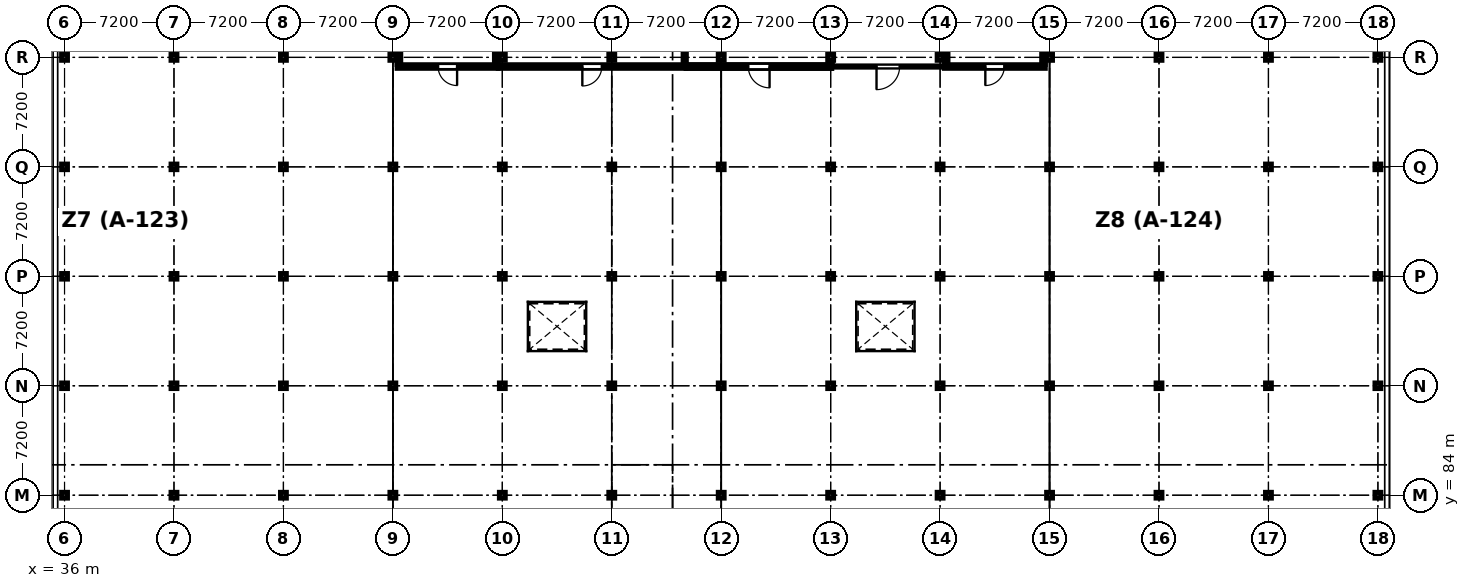
"""IFC4 building model, lengths in metres.
Left out: names, types, materials, properties, quantities, classifications, styles, units other than length and angle.
Written with IfcOpenShell. Run it as: python <this file> out.ifc"""

import sys

from ifc_helpers import new_model, si_unit, direction, frame, frame_2d, origin, origin_2d, place, context, subcontext, project, spatial, rectangle, i_section, extrude, element, fill, save


model = new_model("IFC4")
c1 = context("Model", 3, precision=1e-05, world=origin(), true_north=direction((0.0, 1.0)))
c2 = subcontext(c1, "Body", "Model", "MODEL_VIEW")
j1 = project(units=[si_unit("LENGTHUNIT", "METRE"), si_unit("PLANEANGLEUNIT", "RADIAN")], contexts=[c1])
p1 = place(None, origin())
s1 = spatial("IfcSite", under=j1, at=p1, CompositionType="ELEMENT")
p2 = place(p1, origin())
s2 = spatial("IfcBuilding", under=s1, at=p2, CompositionType="ELEMENT")
p3 = place(p2, frame((0.0, 0.0, 5.4)))
s3 = spatial("IfcBuildingStorey", under=s2, at=p3, CompositionType="ELEMENT", Elevation=5.4)
p4 = place(p3, frame((36.0, 84.0, 0.0), z_axis=(0.0, 0.0, 1.0), x_axis=(1.0, 0.0, 0.0)))
e1 = element("IfcColumn", 1, at=p4, inside=s3, PredefinedType="COLUMN", context=c2, shape_type="SweptSolid", body=[
    extrude(i_section(OverallWidth=0.399, OverallDepth=0.394, WebThickness=0.023, FlangeThickness=0.037, FilletRadius=0.015, at=origin_2d()), origin(), (0.0, 0.0, 1.0), 3.9),
])
for number, where, z_axis, x_axis in (
    (2, (36.0, 91.2, 0.0), (0.0, 0.0, 1.0), (1.0, 0.0, 0.0)),
    (3, (36.0, 98.4, 0.0), (0.0, 0.0, 1.0), (1.0, 0.0, 0.0)),
    (4, (36.0, 105.6, 0.0), (0.0, 0.0, 1.0), (1.0, 0.0, 0.0)),
):
    element("IfcColumn", number, at=place(p3, frame(where, z_axis=z_axis, x_axis=x_axis)), inside=s3, PredefinedType="COLUMN", context=c2, shape_type="SweptSolid", body=[
        extrude(i_section(OverallWidth=0.396, OverallDepth=0.381, WebThickness=0.019, FlangeThickness=0.03, FilletRadius=0.015, at=origin_2d()), origin(), (0.0, 0.0, 1.0), 3.9),
    ])
for number, where, z_axis, x_axis in (
    (5, (36.0, 112.8, 0.0), (0.0, 0.0, 1.0), (1.0, 0.0, 0.0)),
    (6, (43.2, 84.0, 0.0), (0.0, 0.0, 1.0), (1.0, 0.0, 0.0)),
):
    element("IfcColumn", number, at=place(p3, frame(where, z_axis=z_axis, x_axis=x_axis)), inside=s3, PredefinedType="COLUMN", context=c2, shape_type="SweptSolid", body=[
        extrude(i_section(OverallWidth=0.399, OverallDepth=0.394, WebThickness=0.023, FlangeThickness=0.037, FilletRadius=0.015, at=origin_2d()), origin(), (0.0, 0.0, 1.0), 3.9),
    ])
for number, where, z_axis, x_axis in (
    (7, (43.2, 91.2, 0.0), (0.0, 0.0, 1.0), (1.0, 0.0, 0.0)),
    (8, (43.2, 98.4, 0.0), (0.0, 0.0, 1.0), (1.0, 0.0, 0.0)),
    (9, (43.2, 105.6, 0.0), (0.0, 0.0, 1.0), (1.0, 0.0, 0.0)),
):
    element("IfcColumn", number, at=place(p3, frame(where, z_axis=z_axis, x_axis=x_axis)), inside=s3, PredefinedType="COLUMN", context=c2, shape_type="SweptSolid", body=[
        extrude(i_section(OverallWidth=0.396, OverallDepth=0.381, WebThickness=0.019, FlangeThickness=0.03, FilletRadius=0.015, at=origin_2d()), origin(), (0.0, 0.0, 1.0), 3.9),
    ])
for number, where, z_axis, x_axis in (
    (10, (43.2, 112.8, 0.0), (0.0, 0.0, 1.0), (1.0, 0.0, 0.0)),
    (11, (50.4, 84.0, 0.0), (0.0, 0.0, 1.0), (1.0, 0.0, 0.0)),
):
    element("IfcColumn", number, at=place(p3, frame(where, z_axis=z_axis, x_axis=x_axis)), inside=s3, PredefinedType="COLUMN", context=c2, shape_type="SweptSolid", body=[
        extrude(i_section(OverallWidth=0.399, OverallDepth=0.394, WebThickness=0.023, FlangeThickness=0.037, FilletRadius=0.015, at=origin_2d()), origin(), (0.0, 0.0, 1.0), 3.9),
    ])
for number, where, z_axis, x_axis in (
    (12, (50.4, 91.2, 0.0), (0.0, 0.0, 1.0), (1.0, 0.0, 0.0)),
    (13, (50.4, 98.4, 0.0), (0.0, 0.0, 1.0), (1.0, 0.0, 0.0)),
    (14, (50.4, 105.6, 0.0), (0.0, 0.0, 1.0), (1.0, 0.0, 0.0)),
):
    element("IfcColumn", number, at=place(p3, frame(where, z_axis=z_axis, x_axis=x_axis)), inside=s3, PredefinedType="COLUMN", context=c2, shape_type="SweptSolid", body=[
        extrude(i_section(OverallWidth=0.396, OverallDepth=0.381, WebThickness=0.019, FlangeThickness=0.03, FilletRadius=0.015, at=origin_2d()), origin(), (0.0, 0.0, 1.0), 3.9),
    ])
for number, where, z_axis, x_axis in (
    (15, (50.4, 112.8, 0.0), (0.0, 0.0, 1.0), (1.0, 0.0, 0.0)),
    (16, (57.6, 84.0, 0.0), (0.0, 0.0, 1.0), (1.0, 0.0, 0.0)),
):
    element("IfcColumn", number, at=place(p3, frame(where, z_axis=z_axis, x_axis=x_axis)), inside=s3, PredefinedType="COLUMN", context=c2, shape_type="SweptSolid", body=[
        extrude(i_section(OverallWidth=0.399, OverallDepth=0.394, WebThickness=0.023, FlangeThickness=0.037, FilletRadius=0.015, at=origin_2d()), origin(), (0.0, 0.0, 1.0), 3.9),
    ])
for number, where, z_axis, x_axis in (
    (17, (57.6, 91.2, 0.0), (0.0, 0.0, 1.0), (1.0, 0.0, 0.0)),
    (18, (57.6, 98.4, 0.0), (0.0, 0.0, 1.0), (1.0, 0.0, 0.0)),
    (19, (57.6, 105.6, 0.0), (0.0, 0.0, 1.0), (1.0, 0.0, 0.0)),
):
    element("IfcColumn", number, at=place(p3, frame(where, z_axis=z_axis, x_axis=x_axis)), inside=s3, PredefinedType="COLUMN", context=c2, shape_type="SweptSolid", body=[
        extrude(i_section(OverallWidth=0.396, OverallDepth=0.381, WebThickness=0.019, FlangeThickness=0.03, FilletRadius=0.015, at=origin_2d()), origin(), (0.0, 0.0, 1.0), 3.9),
    ])
for number, where, z_axis, x_axis in (
    (20, (57.6, 112.8, 0.0), (0.0, 0.0, 1.0), (1.0, 0.0, 0.0)),
    (21, (64.8, 84.0, 0.0), (0.0, 0.0, 1.0), (1.0, 0.0, 0.0)),
):
    element("IfcColumn", number, at=place(p3, frame(where, z_axis=z_axis, x_axis=x_axis)), inside=s3, PredefinedType="COLUMN", context=c2, shape_type="SweptSolid", body=[
        extrude(i_section(OverallWidth=0.399, OverallDepth=0.394, WebThickness=0.023, FlangeThickness=0.037, FilletRadius=0.015, at=origin_2d()), origin(), (0.0, 0.0, 1.0), 3.9),
    ])
for number, where, z_axis, x_axis in (
    (22, (64.8, 91.2, 0.0), (0.0, 0.0, 1.0), (1.0, 0.0, 0.0)),
    (23, (64.8, 98.4, 0.0), (0.0, 0.0, 1.0), (1.0, 0.0, 0.0)),
    (24, (64.8, 105.6, 0.0), (0.0, 0.0, 1.0), (1.0, 0.0, 0.0)),
):
    element("IfcColumn", number, at=place(p3, frame(where, z_axis=z_axis, x_axis=x_axis)), inside=s3, PredefinedType="COLUMN", context=c2, shape_type="SweptSolid", body=[
        extrude(i_section(OverallWidth=0.396, OverallDepth=0.381, WebThickness=0.019, FlangeThickness=0.03, FilletRadius=0.015, at=origin_2d()), origin(), (0.0, 0.0, 1.0), 3.9),
    ])
for number, where, z_axis, x_axis in (
    (25, (64.8, 112.8, 0.0), (0.0, 0.0, 1.0), (1.0, 0.0, 0.0)),
    (26, (72.0, 84.0, 0.0), (0.0, 0.0, 1.0), (1.0, 0.0, 0.0)),
):
    element("IfcColumn", number, at=place(p3, frame(where, z_axis=z_axis, x_axis=x_axis)), inside=s3, PredefinedType="COLUMN", context=c2, shape_type="SweptSolid", body=[
        extrude(i_section(OverallWidth=0.399, OverallDepth=0.394, WebThickness=0.023, FlangeThickness=0.037, FilletRadius=0.015, at=origin_2d()), origin(), (0.0, 0.0, 1.0), 3.9),
    ])
for number, where, z_axis, x_axis in (
    (27, (72.0, 91.2, 0.0), (0.0, 0.0, 1.0), (1.0, 0.0, 0.0)),
    (28, (72.0, 98.4, 0.0), (0.0, 0.0, 1.0), (1.0, 0.0, 0.0)),
    (29, (72.0, 105.6, 0.0), (0.0, 0.0, 1.0), (1.0, 0.0, 0.0)),
):
    element("IfcColumn", number, at=place(p3, frame(where, z_axis=z_axis, x_axis=x_axis)), inside=s3, PredefinedType="COLUMN", context=c2, shape_type="SweptSolid", body=[
        extrude(i_section(OverallWidth=0.396, OverallDepth=0.381, WebThickness=0.019, FlangeThickness=0.03, FilletRadius=0.015, at=origin_2d()), origin(), (0.0, 0.0, 1.0), 3.9),
    ])
for number, where, z_axis, x_axis in (
    (30, (72.0, 112.8, 0.0), (0.0, 0.0, 1.0), (1.0, 0.0, 0.0)),
    (31, (79.2, 84.0, 0.0), (0.0, 0.0, 1.0), (1.0, 0.0, 0.0)),
):
    element("IfcColumn", number, at=place(p3, frame(where, z_axis=z_axis, x_axis=x_axis)), inside=s3, PredefinedType="COLUMN", context=c2, shape_type="SweptSolid", body=[
        extrude(i_section(OverallWidth=0.399, OverallDepth=0.394, WebThickness=0.023, FlangeThickness=0.037, FilletRadius=0.015, at=origin_2d()), origin(), (0.0, 0.0, 1.0), 3.9),
    ])
for number, where, z_axis, x_axis in (
    (32, (79.2, 91.2, 0.0), (0.0, 0.0, 1.0), (1.0, 0.0, 0.0)),
    (33, (79.2, 98.4, 0.0), (0.0, 0.0, 1.0), (1.0, 0.0, 0.0)),
    (34, (79.2, 105.6, 0.0), (0.0, 0.0, 1.0), (1.0, 0.0, 0.0)),
):
    element("IfcColumn", number, at=place(p3, frame(where, z_axis=z_axis, x_axis=x_axis)), inside=s3, PredefinedType="COLUMN", context=c2, shape_type="SweptSolid", body=[
        extrude(i_section(OverallWidth=0.396, OverallDepth=0.381, WebThickness=0.019, FlangeThickness=0.03, FilletRadius=0.015, at=origin_2d()), origin(), (0.0, 0.0, 1.0), 3.9),
    ])
for number, where, z_axis, x_axis in (
    (35, (79.2, 112.8, 0.0), (0.0, 0.0, 1.0), (1.0, 0.0, 0.0)),
    (36, (86.4, 84.0, 0.0), (0.0, 0.0, 1.0), (1.0, 0.0, 0.0)),
):
    element("IfcColumn", number, at=place(p3, frame(where, z_axis=z_axis, x_axis=x_axis)), inside=s3, PredefinedType="COLUMN", context=c2, shape_type="SweptSolid", body=[
        extrude(i_section(OverallWidth=0.399, OverallDepth=0.394, WebThickness=0.023, FlangeThickness=0.037, FilletRadius=0.015, at=origin_2d()), origin(), (0.0, 0.0, 1.0), 3.9),
    ])
for number, where, z_axis, x_axis in (
    (37, (86.4, 91.2, 0.0), (0.0, 0.0, 1.0), (1.0, 0.0, 0.0)),
    (38, (86.4, 98.4, 0.0), (0.0, 0.0, 1.0), (1.0, 0.0, 0.0)),
    (39, (86.4, 105.6, 0.0), (0.0, 0.0, 1.0), (1.0, 0.0, 0.0)),
):
    element("IfcColumn", number, at=place(p3, frame(where, z_axis=z_axis, x_axis=x_axis)), inside=s3, PredefinedType="COLUMN", context=c2, shape_type="SweptSolid", body=[
        extrude(i_section(OverallWidth=0.396, OverallDepth=0.381, WebThickness=0.019, FlangeThickness=0.03, FilletRadius=0.015, at=origin_2d()), origin(), (0.0, 0.0, 1.0), 3.9),
    ])
for number, where, z_axis, x_axis in (
    (40, (86.4, 112.8, 0.0), (0.0, 0.0, 1.0), (1.0, 0.0, 0.0)),
    (41, (93.6, 84.0, 0.0), (0.0, 0.0, 1.0), (1.0, 0.0, 0.0)),
):
    element("IfcColumn", number, at=place(p3, frame(where, z_axis=z_axis, x_axis=x_axis)), inside=s3, PredefinedType="COLUMN", context=c2, shape_type="SweptSolid", body=[
        extrude(i_section(OverallWidth=0.399, OverallDepth=0.394, WebThickness=0.023, FlangeThickness=0.037, FilletRadius=0.015, at=origin_2d()), origin(), (0.0, 0.0, 1.0), 3.9),
    ])
for number, where, z_axis, x_axis in (
    (42, (93.6, 91.2, 0.0), (0.0, 0.0, 1.0), (1.0, 0.0, 0.0)),
    (43, (93.6, 98.4, 0.0), (0.0, 0.0, 1.0), (1.0, 0.0, 0.0)),
    (44, (93.6, 105.6, 0.0), (0.0, 0.0, 1.0), (1.0, 0.0, 0.0)),
):
    element("IfcColumn", number, at=place(p3, frame(where, z_axis=z_axis, x_axis=x_axis)), inside=s3, PredefinedType="COLUMN", context=c2, shape_type="SweptSolid", body=[
        extrude(i_section(OverallWidth=0.396, OverallDepth=0.381, WebThickness=0.019, FlangeThickness=0.03, FilletRadius=0.015, at=origin_2d()), origin(), (0.0, 0.0, 1.0), 3.9),
    ])
for number, where, z_axis, x_axis in (
    (45, (93.6, 112.8, 0.0), (0.0, 0.0, 1.0), (1.0, 0.0, 0.0)),
    (46, (100.8, 84.0, 0.0), (0.0, 0.0, 1.0), (1.0, 0.0, 0.0)),
):
    element("IfcColumn", number, at=place(p3, frame(where, z_axis=z_axis, x_axis=x_axis)), inside=s3, PredefinedType="COLUMN", context=c2, shape_type="SweptSolid", body=[
        extrude(i_section(OverallWidth=0.399, OverallDepth=0.394, WebThickness=0.023, FlangeThickness=0.037, FilletRadius=0.015, at=origin_2d()), origin(), (0.0, 0.0, 1.0), 3.9),
    ])
for number, where, z_axis, x_axis in (
    (47, (100.8, 91.2, 0.0), (0.0, 0.0, 1.0), (1.0, 0.0, 0.0)),
    (48, (100.8, 98.4, 0.0), (0.0, 0.0, 1.0), (1.0, 0.0, 0.0)),
    (49, (100.8, 105.6, 0.0), (0.0, 0.0, 1.0), (1.0, 0.0, 0.0)),
):
    element("IfcColumn", number, at=place(p3, frame(where, z_axis=z_axis, x_axis=x_axis)), inside=s3, PredefinedType="COLUMN", context=c2, shape_type="SweptSolid", body=[
        extrude(i_section(OverallWidth=0.396, OverallDepth=0.381, WebThickness=0.019, FlangeThickness=0.03, FilletRadius=0.015, at=origin_2d()), origin(), (0.0, 0.0, 1.0), 3.9),
    ])
for number, where, z_axis, x_axis in (
    (50, (100.8, 112.8, 0.0), (0.0, 0.0, 1.0), (1.0, 0.0, 0.0)),
    (51, (108.0, 84.0, 0.0), (0.0, 0.0, 1.0), (1.0, 0.0, 0.0)),
):
    element("IfcColumn", number, at=place(p3, frame(where, z_axis=z_axis, x_axis=x_axis)), inside=s3, PredefinedType="COLUMN", context=c2, shape_type="SweptSolid", body=[
        extrude(i_section(OverallWidth=0.399, OverallDepth=0.394, WebThickness=0.023, FlangeThickness=0.037, FilletRadius=0.015, at=origin_2d()), origin(), (0.0, 0.0, 1.0), 3.9),
    ])
for number, where, z_axis, x_axis in (
    (52, (108.0, 91.2, 0.0), (0.0, 0.0, 1.0), (1.0, 0.0, 0.0)),
    (53, (108.0, 98.4, 0.0), (0.0, 0.0, 1.0), (1.0, 0.0, 0.0)),
    (54, (108.0, 105.6, 0.0), (0.0, 0.0, 1.0), (1.0, 0.0, 0.0)),
):
    element("IfcColumn", number, at=place(p3, frame(where, z_axis=z_axis, x_axis=x_axis)), inside=s3, PredefinedType="COLUMN", context=c2, shape_type="SweptSolid", body=[
        extrude(i_section(OverallWidth=0.396, OverallDepth=0.381, WebThickness=0.019, FlangeThickness=0.03, FilletRadius=0.015, at=origin_2d()), origin(), (0.0, 0.0, 1.0), 3.9),
    ])
for number, where, z_axis, x_axis in (
    (55, (108.0, 112.8, 0.0), (0.0, 0.0, 1.0), (1.0, 0.0, 0.0)),
    (56, (115.2, 84.0, 0.0), (0.0, 0.0, 1.0), (1.0, 0.0, 0.0)),
):
    element("IfcColumn", number, at=place(p3, frame(where, z_axis=z_axis, x_axis=x_axis)), inside=s3, PredefinedType="COLUMN", context=c2, shape_type="SweptSolid", body=[
        extrude(i_section(OverallWidth=0.399, OverallDepth=0.394, WebThickness=0.023, FlangeThickness=0.037, FilletRadius=0.015, at=origin_2d()), origin(), (0.0, 0.0, 1.0), 3.9),
    ])
for number, where, z_axis, x_axis in (
    (57, (115.2, 91.2, 0.0), (0.0, 0.0, 1.0), (1.0, 0.0, 0.0)),
    (58, (115.2, 98.4, 0.0), (0.0, 0.0, 1.0), (1.0, 0.0, 0.0)),
    (59, (115.2, 105.6, 0.0), (0.0, 0.0, 1.0), (1.0, 0.0, 0.0)),
):
    element("IfcColumn", number, at=place(p3, frame(where, z_axis=z_axis, x_axis=x_axis)), inside=s3, PredefinedType="COLUMN", context=c2, shape_type="SweptSolid", body=[
        extrude(i_section(OverallWidth=0.396, OverallDepth=0.381, WebThickness=0.019, FlangeThickness=0.03, FilletRadius=0.015, at=origin_2d()), origin(), (0.0, 0.0, 1.0), 3.9),
    ])
for number, where, z_axis, x_axis in (
    (60, (115.2, 112.8, 0.0), (0.0, 0.0, 1.0), (1.0, 0.0, 0.0)),
    (61, (122.4, 84.0, 0.0), (0.0, 0.0, 1.0), (1.0, 0.0, 0.0)),
):
    element("IfcColumn", number, at=place(p3, frame(where, z_axis=z_axis, x_axis=x_axis)), inside=s3, PredefinedType="COLUMN", context=c2, shape_type="SweptSolid", body=[
        extrude(i_section(OverallWidth=0.399, OverallDepth=0.394, WebThickness=0.023, FlangeThickness=0.037, FilletRadius=0.015, at=origin_2d()), origin(), (0.0, 0.0, 1.0), 3.9),
    ])
for number, where, z_axis, x_axis in (
    (62, (122.4, 91.2, 0.0), (0.0, 0.0, 1.0), (1.0, 0.0, 0.0)),
    (63, (122.4, 98.4, 0.0), (0.0, 0.0, 1.0), (1.0, 0.0, 0.0)),
    (64, (122.4, 105.6, 0.0), (0.0, 0.0, 1.0), (1.0, 0.0, 0.0)),
):
    element("IfcColumn", number, at=place(p3, frame(where, z_axis=z_axis, x_axis=x_axis)), inside=s3, PredefinedType="COLUMN", context=c2, shape_type="SweptSolid", body=[
        extrude(i_section(OverallWidth=0.396, OverallDepth=0.381, WebThickness=0.019, FlangeThickness=0.03, FilletRadius=0.015, at=origin_2d()), origin(), (0.0, 0.0, 1.0), 3.9),
    ])
p5 = place(p3, frame((122.4, 112.8, 0.0), z_axis=(0.0, 0.0, 1.0), x_axis=(1.0, 0.0, 0.0)))
e65 = element("IfcColumn", 65, at=p5, inside=s3, PredefinedType="COLUMN", context=c2, shape_type="SweptSolid", body=[
    extrude(i_section(OverallWidth=0.399, OverallDepth=0.394, WebThickness=0.023, FlangeThickness=0.037, FilletRadius=0.015, at=origin_2d()), origin(), (0.0, 0.0, 1.0), 3.9),
])
p6 = place(p3, frame((64.525, 112.2, 0.0), z_axis=(0.0, 0.0, 1.0), x_axis=(-1.0, 0.0, 0.0)))
e66 = element("IfcWall", 66, at=p6, inside=s3, PredefinedType="PARTITIONING", context=c2, shape_type="SweptSolid", body=[
    extrude(rectangle(XDim=6.65, YDim=0.25, at=frame_2d((3.325, 0.0))), origin(), (0.0, 0.0, 1.0), 2.967),
])
p7 = place(p6, frame((2.7, 0.0, 0.0)))
e67 = element("IfcOpeningElement", 67, at=p7, cuts=e66, PredefinedType="OPENING", context=c2, shape_type="SweptSolid", body=[
    extrude(rectangle(XDim=1.25, YDim=2.2, at=frame_2d((0.625, 1.1))), frame((0.0, 0.135, 0.0), z_axis=(0.0, -1.0, 0.0), x_axis=(1.0, 0.0, 0.0)), (0.0, 0.0, 1.0), 0.27),
])
for number, where, z_axis, x_axis in (
    (68, (58.0, 112.327, 0.0), (0.0, 0.0, 1.0), (0.0, 1.0, 0.0)),
    (69, (64.4, 115.998, 0.0), (0.0, 0.0, 1.0), (0.0, -1.0, 0.0)),
):
    element("IfcWall", number, at=place(p3, frame(where, z_axis=z_axis, x_axis=x_axis)), inside=s3, PredefinedType="PARTITIONING", context=c2, shape_type="SweptSolid", body=[
        extrude(rectangle(XDim=3.671, YDim=0.25, at=frame_2d((1.835, 0.0))), origin(), (0.0, 0.0, 1.0), 2.967),
    ])
p8 = place(p3, frame((100.525, 112.2, 0.0), z_axis=(0.0, 0.0, 1.0), x_axis=(-1.0, 0.0, 0.0)))
e70 = element("IfcWall", 70, at=p8, inside=s3, PredefinedType="PARTITIONING", context=c2, shape_type="SweptSolid", body=[
    extrude(rectangle(XDim=6.65, YDim=0.25, at=frame_2d((3.325, 0.0))), origin(), (0.0, 0.0, 1.0), 2.967),
])
p9 = place(p8, frame((2.7, 0.0, 0.0)))
e71 = element("IfcOpeningElement", 71, at=p9, cuts=e70, PredefinedType="OPENING", context=c2, shape_type="SweptSolid", body=[
    extrude(rectangle(XDim=1.25, YDim=2.2, at=frame_2d((0.625, 1.1))), frame((0.0, 0.135, 0.0), z_axis=(0.0, -1.0, 0.0), x_axis=(1.0, 0.0, 0.0)), (0.0, 0.0, 1.0), 0.27),
])
for number, where, z_axis, x_axis in (
    (72, (94.0, 112.327, 0.0), (0.0, 0.0, 1.0), (0.0, 1.0, 0.0)),
    (73, (100.4, 116.011, 0.0), (0.0, 0.0, 1.0), (0.0, -1.0, 0.0)),
):
    element("IfcWall", number, at=place(p3, frame(where, z_axis=z_axis, x_axis=x_axis)), inside=s3, PredefinedType="PARTITIONING", context=c2, shape_type="SweptSolid", body=[
        extrude(rectangle(XDim=3.684, YDim=0.25, at=frame_2d((1.842, 0.0))), origin(), (0.0, 0.0, 1.0), 2.967),
    ])
p10 = place(p3, frame((76.88, 112.2, 0.0), z_axis=(0.0, 0.0, 1.0), x_axis=(-1.0, 0.0, 0.0)))
e74 = element("IfcWall", 74, at=p10, inside=s3, PredefinedType="PARTITIONING", context=c2, shape_type="SweptSolid", body=[
    extrude(rectangle(XDim=12.353, YDim=0.25, at=frame_2d((6.176, 0.0))), origin(), (0.0, 0.0, 1.0), 2.967),
])
p11 = place(p10, frame((5.536, 0.0, 0.0)))
e75 = element("IfcOpeningElement", 75, at=p11, cuts=e74, PredefinedType="OPENING", context=c2, shape_type="SweptSolid", body=[
    extrude(rectangle(XDim=1.28, YDim=2.28, at=frame_2d((0.64, 1.14))), frame((0.0, 0.135, 0.0), z_axis=(0.0, -1.0, 0.0), x_axis=(1.0, 0.0, 0.0)), (0.0, 0.0, 1.0), 0.27),
])
p12 = place(p3, frame((86.48, 112.2, 0.0), z_axis=(0.0, 0.0, 1.0), x_axis=(-1.0, 0.0, 0.0)))
e76 = element("IfcWall", 76, at=p12, inside=s3, PredefinedType="PARTITIONING", context=c2, shape_type="SweptSolid", body=[
    extrude(rectangle(XDim=9.598, YDim=0.27, at=frame_2d((4.799, 0.0))), origin(), (0.0, 0.0, 1.0), 2.967),
])
p13 = place(p12, frame((4.099, 0.0, 0.0)))
e77 = element("IfcOpeningElement", 77, at=p13, cuts=e76, PredefinedType="OPENING", context=c2, shape_type="SweptSolid", body=[
    extrude(rectangle(XDim=1.4, YDim=2.28, at=frame_2d((0.7, 1.14))), frame((0.0, 0.145, 0.0), z_axis=(0.0, -1.0, 0.0), x_axis=(1.0, 0.0, 0.0)), (0.0, 0.0, 1.0), 0.29),
])
p14 = place(p3, frame((93.873, 112.2, 0.0), z_axis=(0.0, 0.0, 1.0), x_axis=(-1.0, 0.0, 0.0)))
e78 = element("IfcWall", 78, at=p14, inside=s3, PredefinedType="PARTITIONING", context=c2, shape_type="SweptSolid", body=[
    extrude(rectangle(XDim=7.391, YDim=0.095, at=frame_2d((3.696, 0.0))), origin(), (0.0, 0.0, 1.0), 2.967),
])
p15 = place(p14, frame((2.936, 0.0, 0.0)))
e79 = element("IfcOpeningElement", 79, at=p15, cuts=e78, PredefinedType="OPENING", context=c2, shape_type="SweptSolid", body=[
    extrude(rectangle(XDim=1.52, YDim=2.28, at=frame_2d((0.76, 1.14))), frame((0.0, 0.057, 0.0), z_axis=(0.0, -1.0, 0.0), x_axis=(1.0, 0.0, 0.0)), (0.0, 0.0, 1.0), 0.115),
])
p16 = place(p3, frame((76.8, 116.066, 0.0), z_axis=(0.0, 0.0, 1.0), x_axis=(0.0, -1.0, 0.0)))
e80 = element("IfcWall", 80, at=p16, inside=s3, PredefinedType="PARTITIONING", context=c2, shape_type="SweptSolid", body=[
    extrude(rectangle(XDim=3.729, YDim=0.225, at=frame_2d((1.865, 0.0))), origin(), (0.0, 0.0, 1.0), 2.967),
])
p17 = place(p3, frame((86.4, 116.063, 0.0), z_axis=(0.0, 0.0, 1.0), x_axis=(0.0, -1.0, 0.0)))
e81 = element("IfcWall", 81, at=p17, inside=s3, PredefinedType="PARTITIONING", context=c2, shape_type="SweptSolid", body=[
    extrude(rectangle(XDim=3.726, YDim=0.235, at=frame_2d((1.863, 0.0))), origin(), (0.0, 0.0, 1.0), 2.967),
])
p18 = place(p7, origin())
e82 = element("IfcDoor", 82, at=p18, inside=s3, OperationType="SINGLE_SWING_LEFT", PredefinedType="DOOR", context=c2, shape_type="SweptSolid", body=[
    extrude(rectangle(XDim=1.25, YDim=2.2, at=frame_2d((0.625, 1.1))), frame((0.0, 0.025, 0.0), z_axis=(0.0, -1.0, 0.0), x_axis=(1.0, 0.0, 0.0)), (0.0, 0.0, 1.0), 0.05),
])
fill(e67, e82)
p19 = place(p9, origin())
e83 = element("IfcDoor", 83, at=p19, inside=s3, OperationType="SINGLE_SWING_RIGHT", PredefinedType="DOOR", context=c2, shape_type="SweptSolid", body=[
    extrude(rectangle(XDim=1.25, YDim=2.2, at=frame_2d((0.625, 1.1))), frame((0.0, 0.025, 0.0), z_axis=(0.0, -1.0, 0.0), x_axis=(1.0, 0.0, 0.0)), (0.0, 0.0, 1.0), 0.05),
])
fill(e71, e83)
p20 = place(p11, origin())
e84 = element("IfcDoor", 84, at=p20, inside=s3, OperationType="SINGLE_SWING_RIGHT", PredefinedType="DOOR", context=c2, shape_type="SweptSolid", body=[
    extrude(rectangle(XDim=1.28, YDim=2.28, at=frame_2d((0.64, 1.14))), frame((0.0, 0.025, 0.0), z_axis=(0.0, -1.0, 0.0), x_axis=(1.0, 0.0, 0.0)), (0.0, 0.0, 1.0), 0.05),
])
fill(e75, e84)
p21 = place(p13, origin())
e85 = element("IfcDoor", 85, at=p21, inside=s3, OperationType="SINGLE_SWING_LEFT", PredefinedType="DOOR", context=c2, shape_type="SweptSolid", body=[
    extrude(rectangle(XDim=1.4, YDim=2.28, at=frame_2d((0.7, 1.14))), frame((0.0, 0.025, 0.0), z_axis=(0.0, -1.0, 0.0), x_axis=(1.0, 0.0, 0.0)), (0.0, 0.0, 1.0), 0.05),
])
fill(e77, e85)
p22 = place(p15, origin())
e86 = element("IfcDoor", 86, at=p22, inside=s3, OperationType="SINGLE_SWING_RIGHT", PredefinedType="DOOR", context=c2, shape_type="SweptSolid", body=[
    extrude(rectangle(XDim=1.52, YDim=2.28, at=frame_2d((0.76, 1.14))), frame((0.0, 0.025, 0.0), z_axis=(0.0, -1.0, 0.0), x_axis=(1.0, 0.0, 0.0)), (0.0, 0.0, 1.0), 0.05),
])
fill(e79, e86)
save(model, sys.argv[1])
